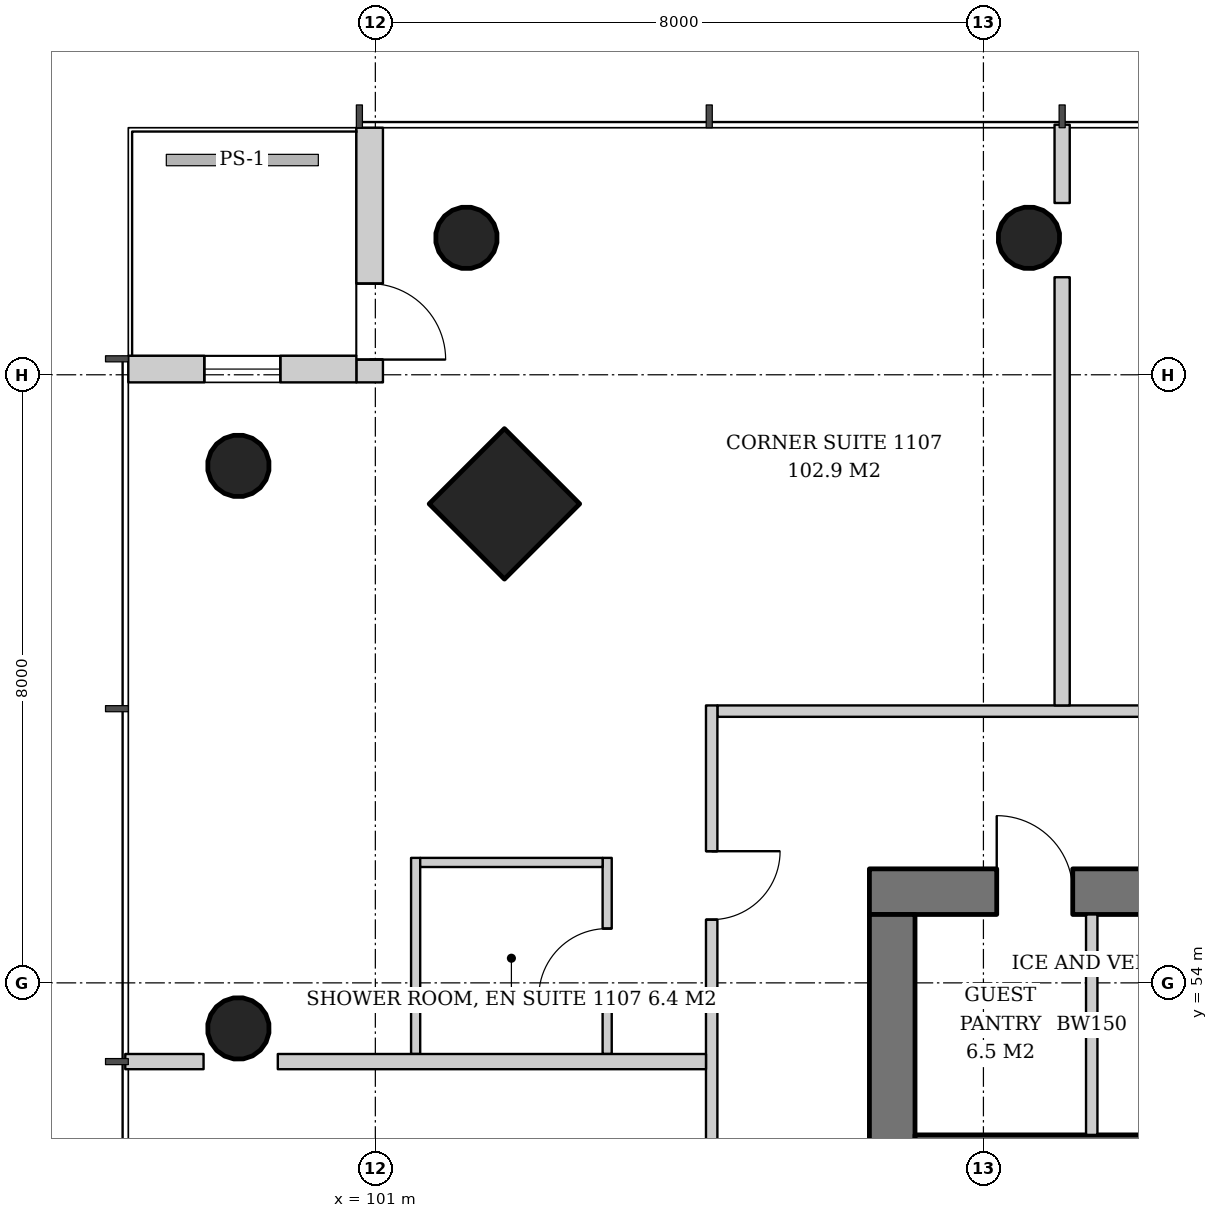
"""IFC4 building model, lengths in metres.
Left out: names, types, materials, properties, quantities, classifications, styles, units other than length and angle.
Written with IfcOpenShell. Run it as: python <this file> out.ifc"""

import sys

from ifc_helpers import new_model, si_unit, direction, frame, frame_2d, origin, origin_2d, place, context, subcontext, project, spatial, rectangle, hollow_circle, extrude, element, fill, save


model = new_model("IFC4")
c1 = context("Model", 3, precision=1e-05, world=origin(), true_north=direction((0.0, 1.0)))
c2 = subcontext(c1, "Body", "Model", "MODEL_VIEW")
j1 = project(units=[si_unit("LENGTHUNIT", "METRE"), si_unit("PLANEANGLEUNIT", "RADIAN")], contexts=[c1])
p1 = place(None, origin())
s1 = spatial("IfcSite", under=j1, at=p1, CompositionType="ELEMENT")
p2 = place(p1, origin())
s2 = spatial("IfcBuilding", under=s1, at=p2, CompositionType="ELEMENT")
p3 = place(p2, frame((0.0, 0.0, 47.6)))
s3 = spatial("IfcBuildingStorey", under=s2, at=p3, CompositionType="ELEMENT", Elevation=47.6)
p4 = place(p3, frame((102.646, 60.354, 0.0), z_axis=(0.043032401563, -0.043032401563, 0.998146494675), x_axis=(0.707106781187, 0.707106781187, 0.0)))
e1 = element("IfcColumn", 1, at=p4, inside=s3, PredefinedType="COLUMN", context=c2, shape_type="SweptSolid", body=[
    extrude(rectangle(XDim=1.4, YDim=1.4, at=origin_2d()), origin(), (0.0, 0.0, 1.0), 3.807),
])
p5 = place(p3, frame((102.146, 63.854, 0.0), z_axis=(0.043032401563, -0.043032401563, 0.998146494675), x_axis=(0.707106781187, 0.707106781187, 0.0)))
e2 = element("IfcColumn", 2, at=p5, inside=s3, PredefinedType="COLUMN", context=c2, shape_type="SweptSolid", body=[
    extrude(hollow_circle(Radius=0.406, WallThickness=0.03, at=origin_2d()), origin(), (0.0, 0.0, 1.0), 3.807),
])
p6 = place(p3, frame((109.573, 63.854, 0.0), z_axis=(0.021563230905, -0.043062285527, 0.998839660125), x_axis=(0.894160516368, 0.44774654769, 0.0)))
e3 = element("IfcColumn", 3, at=p6, inside=s3, PredefinedType="COLUMN", context=c2, shape_type="SweptSolid", body=[
    extrude(hollow_circle(Radius=0.406, WallThickness=0.03, at=origin_2d()), origin(), (0.0, 0.0, 1.0), 3.804),
])
p7 = place(p3, frame((99.146, 60.854, 0.0), z_axis=(0.043032401563, -0.043032401563, 0.998146494675), x_axis=(0.707106781187, 0.707106781187, 0.0)))
e4 = element("IfcColumn", 4, at=p7, inside=s3, PredefinedType="COLUMN", context=c2, shape_type="SweptSolid", body=[
    extrude(hollow_circle(Radius=0.406, WallThickness=0.03, at=origin_2d()), origin(), (0.0, 0.0, 1.0), 3.807),
])
p8 = place(p3, frame((99.146, 53.427, 0.0), z_axis=(0.043062285527, -0.021563230905, 0.998839660125), x_axis=(0.44774654769, 0.894160516368, 0.0)))
e5 = element("IfcColumn", 5, at=p8, inside=s3, PredefinedType="COLUMN", context=c2, shape_type="SweptSolid", body=[
    extrude(hollow_circle(Radius=0.406, WallThickness=0.03, at=origin_2d()), origin(), (0.0, 0.0, 1.0), 3.804),
])
p9 = place(p3, frame((107.5, 55.2, 0.0), z_axis=(0.0, 0.0, 1.0), x_axis=(1.0, 0.0, 0.0)))
e6 = element("IfcWall", 6, at=p9, inside=s3, PredefinedType="SHEAR", context=c2, shape_type="SweptSolid", body=[
    extrude(rectangle(XDim=19.0, YDim=0.6, at=frame_2d((9.5, 0.0))), origin(), (0.0, 0.0, 1.0), 3.8),
])
p10 = place(p9, frame((14.14, 0.0, 0.0)))
e7 = element("IfcOpeningElement", 7, at=p10, cuts=e6, PredefinedType="OPENING", context=c2, shape_type="SweptSolid", body=[
    extrude(rectangle(XDim=1.0, YDim=2.1, at=frame_2d((0.5, 1.05))), frame((0.0, 0.31, 0.0), z_axis=(0.0, -1.0, 0.0), x_axis=(1.0, 0.0, 0.0)), (0.0, 0.0, 1.0), 0.62),
])
p11 = place(p9, frame((1.675, 0.0, 0.0)))
e8 = element("IfcOpeningElement", 8, at=p11, cuts=e6, PredefinedType="OPENING", context=c2, shape_type="SweptSolid", body=[
    extrude(rectangle(XDim=1.0, YDim=2.1, at=frame_2d((0.5, 1.05))), frame((0.0, 0.31, 0.0), z_axis=(0.0, -1.0, 0.0), x_axis=(1.0, 0.0, 0.0)), (0.0, 0.0, 1.0), 0.62),
])
p12 = place(p9, frame((3.587, 0.0, 0.0)))
e9 = element("IfcOpeningElement", 9, at=p12, cuts=e6, PredefinedType="OPENING", context=c2, shape_type="SweptSolid", body=[
    extrude(rectangle(XDim=1.0, YDim=2.1, at=frame_2d((0.5, 1.05))), frame((0.0, 0.31, 0.0), z_axis=(0.0, -1.0, 0.0), x_axis=(1.0, 0.0, 0.0)), (0.0, 0.0, 1.0), 0.62),
])
p13 = place(p3, frame((107.8, 37.1, 0.0), z_axis=(0.0, 0.0, 1.0), x_axis=(0.0, 1.0, 0.0)))
e10 = element("IfcWall", 10, at=p13, inside=s3, PredefinedType="SHEAR", context=c2, shape_type="SweptSolid", body=[
    extrude(rectangle(XDim=17.8, YDim=0.6, at=frame_2d((8.9, 0.0))), origin(), (0.0, 0.0, 1.0), 3.8),
])
p14 = place(p13, frame((8.0, 0.0, 0.0)))
e11 = element("IfcOpeningElement", 11, at=p14, cuts=e10, PredefinedType="OPENING", context=c2, shape_type="SweptSolid", body=[
    extrude(rectangle(XDim=1.8, YDim=2.4, at=frame_2d((0.9, 1.2))), frame((0.0, 0.31, 0.0), z_axis=(0.0, -1.0, 0.0), x_axis=(1.0, 0.0, 0.0)), (0.0, 0.0, 1.0), 0.62),
])
p15 = place(p3, frame((108.1, 51.8, 0.0), z_axis=(0.0, 0.0, 1.0), x_axis=(1.0, 0.0, 0.0)))
e12 = element("IfcWall", 12, at=p15, inside=s3, PredefinedType="SHEAR", context=c2, shape_type="SweptSolid", body=[
    extrude(rectangle(XDim=17.8, YDim=0.4, at=frame_2d((8.9, 0.0))), origin(), (0.0, 0.0, 1.0), 3.8),
])
p16 = place(p3, frame((100.925, 65.25, 0.0), z_axis=(0.0, 0.0, 1.0), x_axis=(0.0, -1.0, 0.0)))
e13 = element("IfcWall", 13, at=p16, inside=s3, PredefinedType="SOLIDWALL", context=c2, shape_type="SweptSolid", body=[
    extrude(rectangle(XDim=3.35, YDim=0.35, at=frame_2d((1.675, 0.0))), origin(), (0.0, 0.0, 1.0), 3.6),
])
p17 = place(p16, frame((2.05, 0.0, 0.0)))
e14 = element("IfcOpeningElement", 14, at=p17, cuts=e13, PredefinedType="OPENING", context=c2, shape_type="SweptSolid", body=[
    extrude(rectangle(XDim=1.0, YDim=2.4, at=frame_2d((0.5, 1.2))), frame((0.0, 0.185, 0.0), z_axis=(0.0, -1.0, 0.0), x_axis=(1.0, 0.0, 0.0)), (0.0, 0.0, 1.0), 0.37),
])
p18 = place(p3, frame((100.75, 62.075, 0.0), z_axis=(0.0, 0.0, 1.0), x_axis=(-1.0, 0.0, 0.0)))
e15 = element("IfcWall", 15, at=p18, inside=s3, PredefinedType="SOLIDWALL", context=c2, shape_type="SweptSolid", body=[
    extrude(rectangle(XDim=3.0, YDim=0.35, at=frame_2d((1.5, 0.0))), origin(), (0.0, 0.0, 1.0), 3.6),
])
p19 = place(p18, frame((1.0, 0.0, 0.9)))
e16 = element("IfcOpeningElement", 16, at=p19, cuts=e15, PredefinedType="OPENING", context=c2, shape_type="SweptSolid", body=[
    extrude(rectangle(XDim=1.0, YDim=2.4, at=frame_2d((0.5, 1.2))), frame((0.0, 0.185, 0.0), z_axis=(0.0, -1.0, 0.0), x_axis=(1.0, 0.0, 0.0)), (0.0, 0.0, 1.0), 0.37),
])
p20 = place(p3, frame((110.425, 52.0, 0.0), z_axis=(0.0, 0.0, 1.0), x_axis=(0.0, 1.0, 0.0)))
e17 = element("IfcWall", 17, at=p20, inside=s3, PredefinedType="SOLIDWALL", context=c2, shape_type="SweptSolid", body=[
    extrude(rectangle(XDim=2.9, YDim=0.15, at=frame_2d((1.45, 0.0))), origin(), (0.0, 0.0, 1.0), 3.6),
])
p21 = place(p3, frame((128.65, 57.575, 0.0), z_axis=(0.0, 0.0, 1.0), x_axis=(-1.0, 0.0, 0.0)))
e18 = element("IfcWall", 18, at=p21, inside=s3, PredefinedType="PARTITIONING", context=c2, shape_type="SweptSolid", body=[
    extrude(rectangle(XDim=23.15, YDim=0.15, at=frame_2d((11.575, 0.0))), origin(), (0.0, 0.0, 1.0), 2.8),
])
p22 = place(p21, frame((1.918, 0.0, 0.0)))
e19 = element("IfcOpeningElement", 19, at=p22, cuts=e18, PredefinedType="OPENING", context=c2, shape_type="SweptSolid", body=[
    extrude(rectangle(XDim=0.9, YDim=2.1, at=frame_2d((0.45, 1.05))), frame((0.0, 0.085, 0.0), z_axis=(0.0, -1.0, 0.0), x_axis=(1.0, 0.0, 0.0)), (0.0, 0.0, 1.0), 0.17),
])
p23 = place(p21, frame((5.678, 0.0, 0.0)))
e20 = element("IfcOpeningElement", 20, at=p23, cuts=e18, PredefinedType="OPENING", context=c2, shape_type="SweptSolid", body=[
    extrude(rectangle(XDim=0.9, YDim=2.1, at=frame_2d((0.45, 1.05))), frame((0.0, 0.085, 0.0), z_axis=(0.0, -1.0, 0.0), x_axis=(1.0, 0.0, 0.0)), (0.0, 0.0, 1.0), 0.17),
])
p24 = place(p21, frame((12.079, 0.0, 0.0)))
e21 = element("IfcOpeningElement", 21, at=p24, cuts=e18, PredefinedType="OPENING", context=c2, shape_type="SweptSolid", body=[
    extrude(rectangle(XDim=0.9, YDim=2.1, at=frame_2d((0.45, 1.05))), frame((0.0, 0.085, 0.0), z_axis=(0.0, -1.0, 0.0), x_axis=(1.0, 0.0, 0.0)), (0.0, 0.0, 1.0), 0.17),
])
p25 = place(p3, frame((110.036, 57.65, 0.0), z_axis=(0.0, 0.0, 1.0), x_axis=(0.0, 1.0, 0.0)))
e22 = element("IfcWall", 22, at=p25, inside=s3, PredefinedType="PARTITIONING", context=c2, shape_type="SweptSolid", body=[
    extrude(rectangle(XDim=5.633, YDim=0.2, at=frame_2d((2.817, 0.0))), origin(), (0.0, 0.0, 1.0), 3.6),
])
p26 = place(p3, frame((110.036, 64.26, 0.0), z_axis=(0.0, 0.0, 1.0), x_axis=(0.0, 1.0, 0.0)))
e23 = element("IfcWall", 23, at=p26, inside=s3, PredefinedType="PARTITIONING", context=c2, shape_type="SweptSolid", body=[
    extrude(rectangle(XDim=1.03, YDim=0.2, at=frame_2d((0.515, 0.0))), origin(), (0.0, 0.0, 1.0), 3.6),
])
p27 = place(p3, frame((104.05, 53.064, 0.0), z_axis=(0.0, 0.0, 1.0), x_axis=(0.0, 1.0, 0.0)))
e24 = element("IfcWall", 24, at=p27, inside=s3, PredefinedType="PARTITIONING", context=c2, shape_type="SweptSolid", body=[
    extrude(rectangle(XDim=2.58, YDim=0.12, at=frame_2d((1.29, 0.0))), origin(), (0.0, 0.0, 1.0), 2.8),
])
p28 = place(p27, frame((0.75, 0.0, 0.0)))
e25 = element("IfcOpeningElement", 25, at=p28, cuts=e24, PredefinedType="OPENING", context=c2, shape_type="SweptSolid", body=[
    extrude(rectangle(XDim=0.9, YDim=2.1, at=frame_2d((0.45, 1.05))), frame((0.0, 0.07, 0.0), z_axis=(0.0, -1.0, 0.0), x_axis=(1.0, 0.0, 0.0)), (0.0, 0.0, 1.0), 0.14),
])
p29 = place(p3, frame((101.53, 53.064, 0.0), z_axis=(0.0, 0.0, 1.0), x_axis=(0.0, 1.0, 0.0)))
e26 = element("IfcWall", 26, at=p29, inside=s3, PredefinedType="PARTITIONING", context=c2, shape_type="SweptSolid", body=[
    extrude(rectangle(XDim=2.58, YDim=0.12, at=frame_2d((1.29, 0.0))), origin(), (0.0, 0.0, 1.0), 2.8),
])
p30 = place(p3, frame((103.99, 55.584, 0.0), z_axis=(0.0, 0.0, 1.0), x_axis=(-1.0, 0.0, 0.0)))
e27 = element("IfcWall", 27, at=p30, inside=s3, PredefinedType="PARTITIONING", context=c2, shape_type="SweptSolid", body=[
    extrude(rectangle(XDim=2.4, YDim=0.12, at=frame_2d((1.2, 0.0))), origin(), (0.0, 0.0, 1.0), 2.847),
])
p31 = place(p3, frame((105.425, 57.65, 0.0), z_axis=(0.0, 0.0, 1.0), x_axis=(0.0, -1.0, 0.0)))
e28 = element("IfcWall", 28, at=p31, inside=s3, PredefinedType="PARTITIONING", context=c2, shape_type="SweptSolid", body=[
    extrude(rectangle(XDim=23.15, YDim=0.15, at=frame_2d((11.575, 0.0))), origin(), (0.0, 0.0, 1.0), 2.8),
])
p32 = place(p31, frame((1.918, 0.0, 0.0)))
e29 = element("IfcOpeningElement", 29, at=p32, cuts=e28, PredefinedType="OPENING", context=c2, shape_type="SweptSolid", body=[
    extrude(rectangle(XDim=0.9, YDim=2.1, at=frame_2d((0.45, 1.05))), frame((0.0, 0.085, 0.0), z_axis=(0.0, -1.0, 0.0), x_axis=(1.0, 0.0, 0.0)), (0.0, 0.0, 1.0), 0.17),
])
p33 = place(p31, frame((7.386, 0.0, 0.0)))
e30 = element("IfcOpeningElement", 30, at=p33, cuts=e28, PredefinedType="OPENING", context=c2, shape_type="SweptSolid", body=[
    extrude(rectangle(XDim=1.0, YDim=2.1, at=frame_2d((0.5, 1.05))), frame((0.0, 0.085, 0.0), z_axis=(0.0, -1.0, 0.0), x_axis=(1.0, 0.0, 0.0)), (0.0, 0.0, 1.0), 0.17),
])
p34 = place(p31, frame((12.079, 0.0, 0.0)))
e31 = element("IfcOpeningElement", 31, at=p34, cuts=e28, PredefinedType="OPENING", context=c2, shape_type="SweptSolid", body=[
    extrude(rectangle(XDim=0.9, YDim=2.1, at=frame_2d((0.45, 1.05))), frame((0.0, 0.085, 0.0), z_axis=(0.0, -1.0, 0.0), x_axis=(1.0, 0.0, 0.0)), (0.0, 0.0, 1.0), 0.17),
])
p35 = place(p3, frame((105.35, 52.964, 0.0), z_axis=(0.0, 0.0, 1.0), x_axis=(-1.0, 0.0, 0.0)))
e32 = element("IfcWall", 32, at=p35, inside=s3, PredefinedType="PARTITIONING", context=c2, shape_type="SweptSolid", body=[
    extrude(rectangle(XDim=5.633, YDim=0.2, at=frame_2d((2.817, 0.0))), origin(), (0.0, 0.0, 1.0), 3.6),
])
p36 = place(p3, frame((98.74, 52.964, 0.0), z_axis=(0.0, 0.0, 1.0), x_axis=(-1.0, 0.0, 0.0)))
e33 = element("IfcWall", 33, at=p36, inside=s3, PredefinedType="PARTITIONING", context=c2, shape_type="SweptSolid", body=[
    extrude(rectangle(XDim=1.03, YDim=0.2, at=frame_2d((0.515, 0.0))), origin(), (0.0, 0.0, 1.0), 3.6),
])
p37 = place(p17, origin())
e34 = element("IfcDoor", 34, at=p37, inside=s3, OperationType="SINGLE_SWING_RIGHT", PredefinedType="DOOR", context=c2, shape_type="SweptSolid", body=[
    extrude(rectangle(XDim=1.0, YDim=2.4, at=frame_2d((0.5, 1.2))), frame((0.0, 0.025, 0.0), z_axis=(0.0, -1.0, 0.0), x_axis=(1.0, 0.0, 0.0)), (0.0, 0.0, 1.0), 0.05),
])
fill(e14, e34)
p38 = place(p19, origin())
e35 = element("IfcWindow", 35, at=p38, inside=s3, PartitioningType="SINGLE_PANEL", PredefinedType="WINDOW", context=c2, shape_type="SweptSolid", body=[
    extrude(rectangle(XDim=1.0, YDim=2.4, at=frame_2d((0.5, 1.2))), frame((0.0, 0.03, 0.0), z_axis=(0.0, -1.0, 0.0), x_axis=(1.0, 0.0, 0.0)), (0.0, 0.0, 1.0), 0.06),
])
fill(e16, e35)
p39 = place(p11, origin())
e36 = element("IfcDoor", 36, at=p39, inside=s3, OperationType="SINGLE_SWING_LEFT", PredefinedType="DOOR", context=c2, shape_type="SweptSolid", body=[
    extrude(rectangle(XDim=1.0, YDim=2.1, at=frame_2d((0.5, 1.05))), frame((0.0, -0.24, 0.0), z_axis=(0.0, -1.0, 0.0), x_axis=(1.0, 0.0, 0.0)), (0.0, 0.0, 1.0), 0.05),
])
fill(e8, e36)
p40 = place(p28, origin())
e37 = element("IfcDoor", 37, at=p40, inside=s3, OperationType="SINGLE_SWING_LEFT", PredefinedType="DOOR", context=c2, shape_type="SweptSolid", body=[
    extrude(rectangle(XDim=0.9, YDim=2.1, at=frame_2d((0.45, 1.05))), frame((0.0, 0.025, 0.0), z_axis=(0.0, -1.0, 0.0), x_axis=(1.0, 0.0, 0.0)), (0.0, 0.0, 1.0), 0.05),
])
fill(e25, e37)
p41 = place(p32, origin())
e38 = element("IfcDoor", 38, at=p41, inside=s3, OperationType="SINGLE_SWING_LEFT", PredefinedType="DOOR", context=c2, shape_type="SweptSolid", body=[
    extrude(rectangle(XDim=0.9, YDim=2.1, at=frame_2d((0.45, 1.05))), frame((0.0, 0.025, 0.0), z_axis=(0.0, -1.0, 0.0), x_axis=(1.0, 0.0, 0.0)), (0.0, 0.0, 1.0), 0.05),
])
fill(e29, e38)
save(model, sys.argv[1])
